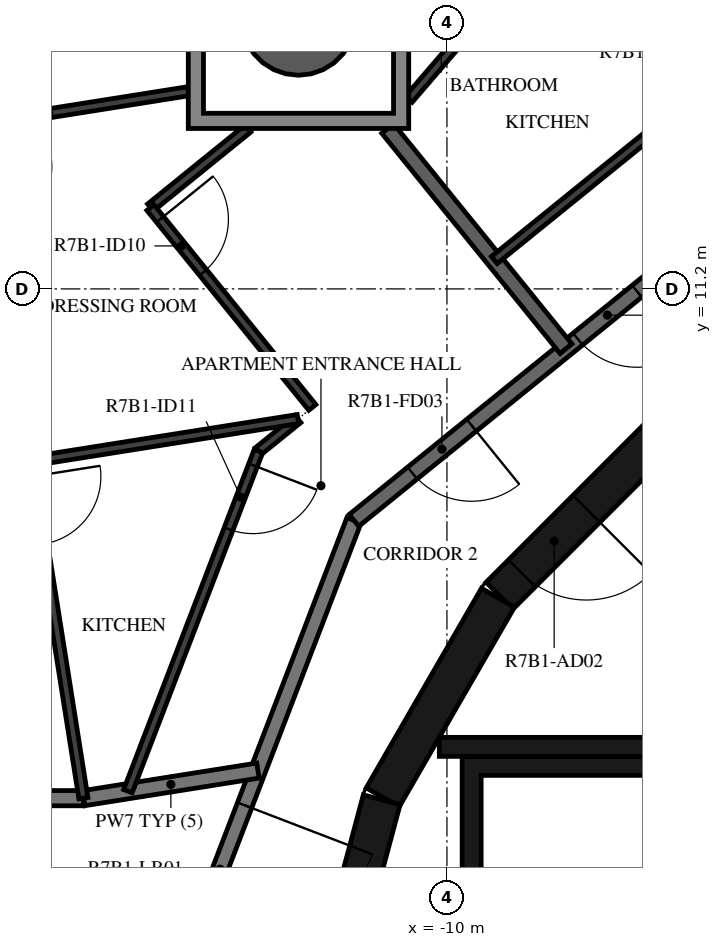
"""IFC4 building model, lengths in metres.
Left out: names, types, materials, properties, quantities, classifications, styles, units other than length and angle.
Written with IfcOpenShell. Run it as: python <this file> out.ifc"""

import sys

from ifc_helpers import new_model, si_unit, direction, frame, frame_2d, origin, origin_2d, place, context, subcontext, project, spatial, polyline, rectangle, hollow_circle, outline, extrude, element, fill, save


model = new_model("IFC4")
c1 = context("Model", 3, precision=1e-05, world=origin(), true_north=direction((0.0, 1.0)))
c2 = subcontext(c1, "Body", "Model", "MODEL_VIEW")
j1 = project(units=[si_unit("LENGTHUNIT", "METRE"), si_unit("PLANEANGLEUNIT", "RADIAN")], contexts=[c1])
p1 = place(None, origin())
s1 = spatial("IfcSite", under=j1, at=p1, CompositionType="ELEMENT")
p2 = place(p1, origin())
s2 = spatial("IfcBuilding", under=s1, at=p2, CompositionType="ELEMENT")
p3 = place(p2, frame((0.0, 0.0, 273.9)))
s3 = spatial("IfcBuildingStorey", under=s2, at=p3, CompositionType="ELEMENT", Elevation=273.9)
p4 = place(p3, frame((-11.953, 14.76, -0.38), z_axis=(0.0, 0.0, 1.0), x_axis=(1.0, 0.0, 0.0)))
e1 = element("IfcColumn", 1, at=p4, inside=s3, PredefinedType="COLUMN", context=c2, shape_type="SweptSolid", body=[
    extrude(hollow_circle(Radius=0.75, WallThickness=0.035, at=origin_2d()), origin(), (0.0, 0.0, 1.0), 3.5),
])
p5 = place(p3, frame((-7.164, 9.308, 0.0), z_axis=(0.0, 0.0, 1.0), x_axis=(-0.707106781187, -0.707106781187, 0.0)))
e2 = element("IfcWall", 2, at=p5, inside=s3, PredefinedType="SHEAR", context=c2, shape_type="SweptSolid", body=[
    extrude(rectangle(XDim=3.032, YDim=0.5, at=frame_2d((1.516, 0.0))), origin(), (0.0, 0.0, 1.0), 3.12),
])
p6 = place(p5, frame((1.416, 0.0, 0.0)))
e3 = element("IfcOpeningElement", 3, at=p6, cuts=e2, PredefinedType="OPENING", context=c2, shape_type="SweptSolid", body=[
    extrude(rectangle(XDim=1.2, YDim=2.1, at=frame_2d((0.6, 1.05))), frame((0.0, 0.26, 0.0), z_axis=(0.0, -1.0, 0.0), x_axis=(1.0, 0.0, 0.0)), (0.0, 0.0, 1.0), 0.52),
])
for number, where, z_axis, x_axis in (
    (4, (-9.329, 7.137, 0.0), (0.0, 0.0, 1.0), (-0.5, -0.866, 0.0)),
    (5, (-10.858, 4.479, 0.0), (0.0, 0.0, 1.0), (-0.259, -0.966, 0.0)),
):
    element("IfcWall", number, at=place(p3, frame(where, z_axis=z_axis, x_axis=x_axis)), inside=s3, PredefinedType="SHEAR", context=c2, shape_type="SweptSolid", body=[
        extrude(rectangle(XDim=3.033, YDim=0.5, at=frame_2d((1.516, 0.0))), origin(), (0.0, 0.0, 1.0), 3.12),
    ])
p7 = place(p3, frame((-7.0, 5.175, 0.0), z_axis=(0.0, 0.0, 1.0), x_axis=(-1.0, 0.0, 0.0)))
e6 = element("IfcWall", 6, at=p7, inside=s3, PredefinedType="SHEAR", context=c2, shape_type="SweptSolid", body=[
    extrude(rectangle(XDim=3.1, YDim=0.25, at=frame_2d((1.55, 0.0))), origin(), (0.0, 0.0, 1.0), 3.12),
])
p8 = place(p3, origin())
e7 = element("IfcWall", 7, at=p8, inside=s3, PredefinedType="SHEAR", context=c2, shape_type="SweptSolid", body=[
    extrude(outline(polyline([(-7.148, 8.97), (-7.0, 8.97), (-7.0, 8.67), (-7.448, 8.67), (-7.148, 8.97)])), origin(), (0.0, 0.0, 1.0), 3.12),
])
p9 = place(p3, origin())
e8 = element("IfcWall", 8, at=p9, inside=s3, PredefinedType="SHEAR", context=c2, shape_type="SweptSolid", body=[
    extrude(outline(polyline([(-9.8, 1.9), (-9.55, 1.9), (-9.55, 4.8), (-5.5, 4.8), (-5.5, 1.9), (-5.25, 1.9), (-5.25, 4.8), (3.1, 4.8), (3.1, 1.9), (3.35, 1.9), (3.35, 4.8), (5.25, 4.8), (5.25, 1.9), (5.5, 1.9), (5.5, 4.8), (7.4, 4.8), (7.4, 1.9), (7.65, 1.9), (7.65, 4.8), (9.55, 4.8), (9.55, 1.9), (9.8, 1.9), (9.8, 4.8), (9.8, 5.05), (-9.8, 5.05), (-9.8, 4.8), (-9.8, 1.9)])), origin(), (0.0, 0.0, 1.0), 3.12),
])
p10 = place(p3, frame((-11.223, 8.154, 0.0), z_axis=(0.0, 0.0, 1.0), x_axis=(-0.358341090983, -0.93359073609, 0.0)))
e9 = element("IfcWall", 9, at=p10, inside=s3, PredefinedType="STANDARD", context=c2, shape_type="SweptSolid", body=[
    extrude(rectangle(XDim=7.181, YDim=0.2, at=frame_2d((3.59, 0.0))), origin(), (0.0, 0.0, 1.0), 3.12),
])
p11 = place(p10, frame((4.014, 0.0, 0.0)))
e10 = element("IfcOpeningElement", 10, at=p11, cuts=e9, PredefinedType="OPENING", context=c2, shape_type="SweptSolid", body=[
    extrude(rectangle(XDim=1.8, YDim=2.1, at=frame_2d((0.9, 1.05))), frame((0.0, 0.11, 0.0), z_axis=(0.0, -1.0, 0.0), x_axis=(1.0, 0.0, 0.0)), (0.0, 0.0, 1.0), 0.22),
])
p12 = place(p3, frame((-5.643, 12.673, 0.0), z_axis=(0.0, 0.0, 1.0), x_axis=(-0.777160148113, -0.629302871585, 0.0)))
e11 = element("IfcWall", 11, at=p12, inside=s3, PredefinedType="STANDARD", context=c2, shape_type="SweptSolid", body=[
    extrude(rectangle(XDim=7.181, YDim=0.2, at=frame_2d((3.59, 0.0))), origin(), (0.0, 0.0, 1.0), 3.12),
])
p13 = place(p12, frame((2.39, 0.0, 0.0)))
e12 = element("IfcOpeningElement", 12, at=p13, cuts=e11, PredefinedType="OPENING", context=c2, shape_type="SweptSolid", body=[
    extrude(rectangle(XDim=1.0, YDim=2.1, at=frame_2d((0.5, 1.05))), frame((0.0, 0.11, 0.0), z_axis=(0.0, -1.0, 0.0), x_axis=(1.0, 0.0, 0.0)), (0.0, 0.0, 1.0), 0.22),
])
p14 = place(p12, frame((5.192, 0.0, 0.0)))
e13 = element("IfcOpeningElement", 13, at=p14, cuts=e11, PredefinedType="OPENING", context=c2, shape_type="SweptSolid", body=[
    extrude(rectangle(XDim=1.0, YDim=2.1, at=frame_2d((0.5, 1.05))), frame((0.0, 0.11, 0.0), z_axis=(0.0, -1.0, 0.0), x_axis=(1.0, 0.0, 0.0)), (0.0, 0.0, 1.0), 0.22),
])
p15 = place(p3, frame((-12.487, 4.863, 0.0), z_axis=(0.0, 0.0, 1.0), x_axis=(-0.98769031179, -0.156422018898, 0.0)))
e14 = element("IfcWall", 14, at=p15, inside=s3, PredefinedType="STANDARD", context=c2, shape_type="SweptSolid", body=[
    extrude(rectangle(XDim=2.319, YDim=0.2, at=frame_2d((1.16, 0.0))), origin(), (0.0, 0.0, 1.0), 3.12),
])
p16 = place(p3, frame((-14.783, 4.5, 0.0), z_axis=(0.0, 0.0, 1.0), x_axis=(-1.0, 0.0, 0.0)))
e15 = element("IfcWall", 15, at=p16, inside=s3, PredefinedType="STANDARD", context=c2, shape_type="SweptSolid", body=[
    extrude(rectangle(XDim=3.645, YDim=0.2, at=frame_2d((1.822, 0.0))), origin(), (0.0, 0.0, 1.0), 3.12),
])
p17 = place(p3, frame((-10.779, 13.31, 0.0), z_axis=(0.0, 0.0, 1.0), x_axis=(0.62931692753, -0.777148766147, 0.0)))
e16 = element("IfcWall", 16, at=p17, inside=s3, PredefinedType="STANDARD", context=c2, shape_type="SweptSolid", body=[
    extrude(rectangle(XDim=3.727, YDim=0.2, at=frame_2d((1.864, 0.0))), origin(), (0.0, 0.0, 1.0), 3.12),
])
p18 = place(p3, frame((-6.274, 14.092, 0.0), z_axis=(0.0, 0.0, 1.0), x_axis=(-0.777162268892, -0.629300252511, 0.0)))
e17 = element("IfcWall", 17, at=p18, inside=s3, PredefinedType="PARTITIONING", context=c2, shape_type="SweptSolid", body=[
    extrude(rectangle(XDim=3.992, YDim=0.12, at=frame_2d((1.996, 0.0))), origin(), (0.0, 0.0, 1.0), 3.12),
])
p19 = place(p18, frame((0.2, 0.0, 0.0)))
e18 = element("IfcOpeningElement", 18, at=p19, cuts=e17, PredefinedType="OPENING", context=c2, shape_type="SweptSolid", body=[
    extrude(rectangle(XDim=0.9, YDim=2.1, at=frame_2d((0.45, 1.05))), frame((0.0, 0.07, 0.0), z_axis=(0.0, -1.0, 0.0), x_axis=(1.0, 0.0, 0.0)), (0.0, 0.0, 1.0), 0.14),
])
p20 = place(p3, frame((-10.91, 16.502, 0.0), z_axis=(0.0, 0.0, 1.0), x_axis=(0.933584453869, -0.358357457707, 0.0)))
e19 = element("IfcWall", 19, at=p20, inside=s3, PredefinedType="PARTITIONING", context=c2, shape_type="SweptSolid", body=[
    extrude(rectangle(XDim=6.212, YDim=0.12, at=frame_2d((3.106, 0.0))), origin(), (0.0, 0.0, 1.0), 3.12),
])
p21 = place(p20, frame((2.657, 0.0, 0.0)))
e20 = element("IfcOpeningElement", 20, at=p21, cuts=e19, PredefinedType="OPENING", context=c2, shape_type="SweptSolid", body=[
    extrude(rectangle(XDim=0.9, YDim=2.1, at=frame_2d((0.45, 1.05))), frame((0.0, 0.07, 0.0), z_axis=(0.0, -1.0, 0.0), x_axis=(1.0, 0.0, 0.0)), (0.0, 0.0, 1.0), 0.14),
])
p22 = place(p3, frame((-8.788, 15.688, 0.0), z_axis=(0.0, 0.0, 1.0), x_axis=(-0.652090514391, -0.758141122115, 0.0)))
e21 = element("IfcWall", 21, at=p22, inside=s3, PredefinedType="PARTITIONING", context=c2, shape_type="SweptSolid", body=[
    extrude(rectangle(XDim=2.629, YDim=0.12, at=frame_2d((1.314, 0.0))), origin(), (0.0, 0.0, 1.0), 3.12),
])
p23 = place(p22, frame((0.2, 0.0, 0.0)))
e22 = element("IfcOpeningElement", 22, at=p23, cuts=e21, PredefinedType="OPENING", context=c2, shape_type="SweptSolid", body=[
    extrude(rectangle(XDim=0.8, YDim=2.1, at=frame_2d((0.4, 1.05))), frame((0.0, 0.07, 0.0), z_axis=(0.0, -1.0, 0.0), x_axis=(1.0, 0.0, 0.0)), (0.0, 0.0, 1.0), 0.14),
])
p24 = place(p3, frame((-12.616, 13.311, 0.0), z_axis=(0.0, 0.0, 1.0), x_axis=(-0.7771657422, -0.629295963082, 0.0)))
e23 = element("IfcWall", 23, at=p24, inside=s3, PredefinedType="PARTITIONING", context=c2, shape_type="SweptSolid", body=[
    extrude(rectangle(XDim=1.653, YDim=0.12, at=frame_2d((0.826, 0.0))), origin(), (0.0, 0.0, 1.0), 3.12),
])
p25 = place(p3, frame((-13.901, 12.271, 0.0), z_axis=(0.0, 0.0, 1.0), x_axis=(0.62932066967, -0.777145735835, 0.0)))
e24 = element("IfcWall", 24, at=p25, inside=s3, PredefinedType="PARTITIONING", context=c2, shape_type="SweptSolid", body=[
    extrude(rectangle(XDim=3.384, YDim=0.12, at=frame_2d((1.692, 0.0))), origin(), (0.0, 0.0, 1.0), 3.12),
])
p26 = place(p25, frame((0.2, 0.0, 0.0)))
e25 = element("IfcOpeningElement", 25, at=p26, cuts=e24, PredefinedType="OPENING", context=c2, shape_type="SweptSolid", body=[
    extrude(rectangle(XDim=0.9, YDim=2.1, at=frame_2d((0.45, 1.05))), frame((0.0, 0.07, 0.0), z_axis=(0.0, -1.0, 0.0), x_axis=(1.0, 0.0, 0.0)), (0.0, 0.0, 1.0), 0.14),
])
p27 = place(p3, frame((-11.96, 9.487, 0.0), z_axis=(0.0, 0.0, 1.0), x_axis=(-0.777219341678, -0.62922976322, 0.0)))
e26 = element("IfcWall", 26, at=p27, inside=s3, PredefinedType="PARTITIONING", context=c2, shape_type="SweptSolid", body=[
    extrude(rectangle(XDim=0.668, YDim=0.12, at=frame_2d((0.334, 0.0))), origin(), (0.0, 0.0, 1.0), 3.12),
])
p28 = place(p3, frame((-12.479, 9.067, 0.0), z_axis=(0.0, 0.0, 1.0), x_axis=(-0.358402229057, -0.933567267104, 0.0)))
e27 = element("IfcWall", 27, at=p28, inside=s3, PredefinedType="PARTITIONING", context=c2, shape_type="SweptSolid", body=[
    extrude(rectangle(XDim=4.793, YDim=0.12, at=frame_2d((2.397, 0.0))), origin(), (0.0, 0.0, 1.0), 3.12),
])
p29 = place(p28, frame((0.2, 0.0, 0.0)))
e28 = element("IfcOpeningElement", 28, at=p29, cuts=e27, PredefinedType="OPENING", context=c2, shape_type="SweptSolid", body=[
    extrude(rectangle(XDim=0.9, YDim=2.1, at=frame_2d((0.45, 1.05))), frame((0.0, 0.07, 0.0), z_axis=(0.0, -1.0, 0.0), x_axis=(1.0, 0.0, 0.0)), (0.0, 0.0, 1.0), 0.14),
])
p30 = place(p3, frame((-16.186, 13.359, 0.0), z_axis=(0.0, 0.0, 1.0), x_axis=(0.987680631298, 0.156483131865, 0.0)))
e29 = element("IfcWall", 29, at=p30, inside=s3, PredefinedType="PARTITIONING", context=c2, shape_type="SweptSolid", body=[
    extrude(rectangle(XDim=2.818, YDim=0.12, at=frame_2d((1.409, 0.0))), origin(), (0.0, 0.0, 1.0), 3.12),
])
p31 = place(p30, frame((0.2, 0.0, 0.0)))
e30 = element("IfcOpeningElement", 30, at=p31, cuts=e29, PredefinedType="OPENING", context=c2, shape_type="SweptSolid", body=[
    extrude(rectangle(XDim=0.8, YDim=2.1, at=frame_2d((0.4, 1.05))), frame((0.0, 0.07, 0.0), z_axis=(0.0, -1.0, 0.0), x_axis=(1.0, 0.0, 0.0)), (0.0, 0.0, 1.0), 0.14),
])
p32 = place(p3, frame((-16.192, 13.399, 0.0), z_axis=(0.0, 0.0, 1.0), x_axis=(0.156405047803, -0.987692999379, 0.0)))
e31 = element("IfcWall", 31, at=p32, inside=s3, PredefinedType="PARTITIONING", context=c2, shape_type="SweptSolid", body=[
    extrude(rectangle(XDim=9.01, YDim=0.12, at=frame_2d((4.505, 0.0))), origin(), (0.0, 0.0, 1.0), 3.12),
])
p33 = place(p32, frame((0.6, 0.0, 0.0)))
e32 = element("IfcOpeningElement", 32, at=p33, cuts=e31, PredefinedType="OPENING", context=c2, shape_type="SweptSolid", body=[
    extrude(rectangle(XDim=0.9, YDim=2.1, at=frame_2d((0.45, 1.05))), frame((0.0, 0.07, 0.0), z_axis=(0.0, -1.0, 0.0), x_axis=(1.0, 0.0, 0.0)), (0.0, 0.0, 1.0), 0.14),
])
p34 = place(p32, frame((4.725, 0.0, 0.0)))
e33 = element("IfcOpeningElement", 33, at=p34, cuts=e31, PredefinedType="OPENING", context=c2, shape_type="SweptSolid", body=[
    extrude(rectangle(XDim=0.9, YDim=2.1, at=frame_2d((0.45, 1.05))), frame((0.0, 0.07, 0.0), z_axis=(0.0, -1.0, 0.0), x_axis=(1.0, 0.0, 0.0)), (0.0, 0.0, 1.0), 0.14),
])
p35 = place(p3, frame((-15.484, 8.929, 0.0), z_axis=(0.0, 0.0, 1.0), x_axis=(0.987689619983, 0.156426387092, 0.0)))
e34 = element("IfcWall", 34, at=p35, inside=s3, PredefinedType="PARTITIONING", context=c2, shape_type="SweptSolid", body=[
    extrude(rectangle(XDim=3.568, YDim=0.12, at=frame_2d((1.784, 0.0))), origin(), (0.0, 0.0, 1.0), 3.12),
])
p36 = place(p3, origin())
e35 = element("IfcWall", 35, at=p36, inside=s3, PredefinedType="STANDARD", context=c2, shape_type="SweptSolid", body=[
    extrude(outline(polyline([(-10.503, 16.21), (-10.503, 13.311), (-13.403, 13.311), (-13.403, 16.21), (-10.503, 16.21)]), holes=[polyline([(-13.203, 13.51), (-10.703, 13.51), (-10.703, 16.01), (-13.203, 16.01), (-13.203, 13.51)])]), origin(), (0.0, 0.0, 1.0), 3.12),
])
p37 = place(p6, origin())
e36 = element("IfcDoor", 36, at=p37, inside=s3, OperationType="SINGLE_SWING_RIGHT", PredefinedType="DOOR", context=c2, shape_type="SweptSolid", body=[
    extrude(rectangle(XDim=1.2, YDim=2.1, at=frame_2d((0.6, 1.05))), frame((0.0, 0.025, 0.0), z_axis=(0.0, -1.0, 0.0), x_axis=(1.0, 0.0, 0.0)), (0.0, 0.0, 1.0), 0.05),
])
fill(e3, e36)
p38 = place(p13, origin())
e37 = element("IfcDoor", 37, at=p38, inside=s3, OperationType="SINGLE_SWING_RIGHT", PredefinedType="DOOR", context=c2, shape_type="SweptSolid", body=[
    extrude(rectangle(XDim=1.0, YDim=2.1, at=frame_2d((0.5, 1.05))), frame((0.0, 0.025, 0.0), z_axis=(0.0, -1.0, 0.0), x_axis=(1.0, 0.0, 0.0)), (0.0, 0.0, 1.0), 0.05),
])
fill(e12, e37)
p39 = place(p14, origin())
e38 = element("IfcDoor", 38, at=p39, inside=s3, OperationType="SINGLE_SWING_LEFT", PredefinedType="DOOR", context=c2, shape_type="SweptSolid", body=[
    extrude(rectangle(XDim=1.0, YDim=2.1, at=frame_2d((0.5, 1.05))), frame((0.0, 0.025, 0.0), z_axis=(0.0, -1.0, 0.0), x_axis=(1.0, 0.0, 0.0)), (0.0, 0.0, 1.0), 0.05),
])
fill(e13, e38)
p40 = place(p26, origin())
e39 = element("IfcDoor", 39, at=p40, inside=s3, OperationType="SINGLE_SWING_LEFT", PredefinedType="DOOR", context=c2, shape_type="SweptSolid", body=[
    extrude(rectangle(XDim=0.9, YDim=2.1, at=frame_2d((0.45, 1.05))), frame((0.0, 0.025, 0.0), z_axis=(0.0, -1.0, 0.0), x_axis=(1.0, 0.0, 0.0)), (0.0, 0.0, 1.0), 0.05),
])
fill(e25, e39)
p41 = place(p29, origin())
e40 = element("IfcDoor", 40, at=p41, inside=s3, OperationType="SINGLE_SWING_LEFT", PredefinedType="DOOR", context=c2, shape_type="SweptSolid", body=[
    extrude(rectangle(XDim=0.9, YDim=2.1, at=frame_2d((0.45, 1.05))), frame((0.0, 0.025, 0.0), z_axis=(0.0, -1.0, 0.0), x_axis=(1.0, 0.0, 0.0)), (0.0, 0.0, 1.0), 0.05),
])
fill(e28, e40)
p42 = place(p31, origin())
e41 = element("IfcDoor", 41, at=p42, inside=s3, OperationType="SINGLE_SWING_LEFT", PredefinedType="DOOR", context=c2, shape_type="SweptSolid", body=[
    extrude(rectangle(XDim=0.8, YDim=2.1, at=frame_2d((0.4, 1.05))), frame((0.0, 0.025, 0.0), z_axis=(0.0, -1.0, 0.0), x_axis=(1.0, 0.0, 0.0)), (0.0, 0.0, 1.0), 0.05),
])
fill(e30, e41)
p43 = place(p11, origin())
e42 = element("IfcDoor", 42, at=p43, inside=s3, OperationType="DOUBLE_DOOR_SINGLE_SWING", PredefinedType="DOOR", context=c2, shape_type="SweptSolid", body=[
    extrude(rectangle(XDim=1.8, YDim=2.1, at=frame_2d((0.9, 1.05))), frame((0.0, 0.025, 0.0), z_axis=(0.0, -1.0, 0.0), x_axis=(1.0, 0.0, 0.0)), (0.0, 0.0, 1.0), 0.05),
])
fill(e10, e42)
save(model, sys.argv[1])
